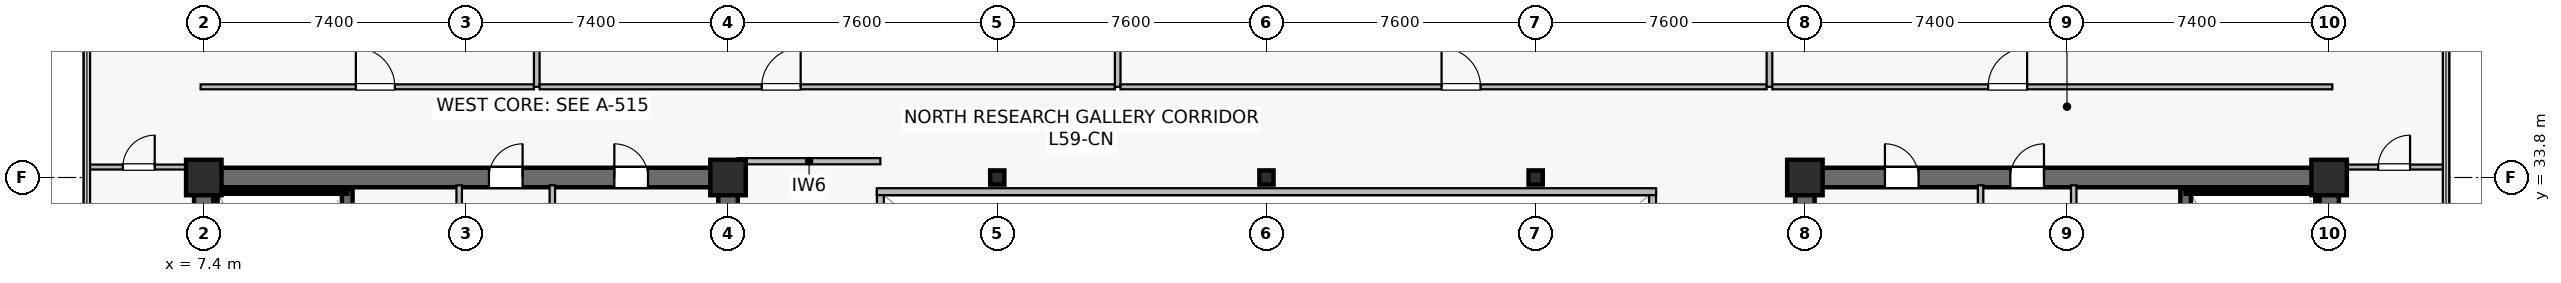
"""IFC4 building model, lengths in metres.
Left out: names, types, materials, properties, quantities, classifications, styles, units other than length and angle.
Written with IfcOpenShell. Run it as: python <this file> out.ifc"""

import sys

from ifc_helpers import new_model, si_unit, direction, frame, frame_2d, origin, origin_2d, place, context, subcontext, project, spatial, rectangle, hollow_rectangle, extrude, source, transform, mapped, element, fill, save


model = new_model("IFC4")
c1 = context("Model", 3, precision=1e-05, world=origin(), true_north=direction((0.0, 1.0)))
c2 = subcontext(c1, "Body", "Model", "MODEL_VIEW")
j1 = project(units=[si_unit("LENGTHUNIT", "METRE"), si_unit("PLANEANGLEUNIT", "RADIAN")], contexts=[c1])
p1 = place(None, origin())
s1 = spatial("IfcSite", under=j1, at=p1, CompositionType="ELEMENT")
p2 = place(p1, origin())
s2 = spatial("IfcBuilding", under=s1, at=p2, CompositionType="ELEMENT")
p3 = place(p2, frame((0.0, 0.0, 246.5)))
s3 = spatial("IfcBuildingStorey", under=s2, at=p3, CompositionType="ELEMENT", Elevation=246.5)
p4 = place(p3, frame((7.125, 33.8, 0.0), z_axis=(0.0, 0.0, 1.0), x_axis=(1.0, 0.0, 0.0)))
e1 = element("IfcWall", 1, at=p4, inside=s3, PredefinedType="SHEAR", context=c2, shape_type="SweptSolid", body=[
    extrude(rectangle(XDim=15.35, YDim=0.55, at=frame_2d((7.675, 0.0))), origin(), (0.0, 0.0, 1.0), 3.8),
])
p5 = place(p4, frame((8.325, 0.0, 0.0)))
e2 = element("IfcOpeningElement", 2, at=p5, cuts=e1, PredefinedType="OPENING", context=c2, shape_type="SweptSolid", body=[
    extrude(rectangle(XDim=0.95, YDim=2.15, at=frame_2d((0.475, 1.075))), frame((0.0, 0.285, 0.0), z_axis=(0.0, -1.0, 0.0), x_axis=(1.0, 0.0, 0.0)), (0.0, 0.0, 1.0), 0.57),
])
p6 = place(p4, frame((11.865, 0.0, 0.0)))
e3 = element("IfcOpeningElement", 3, at=p6, cuts=e1, PredefinedType="OPENING", context=c2, shape_type="SweptSolid", body=[
    extrude(rectangle(XDim=0.95, YDim=2.15, at=frame_2d((0.475, 1.075))), frame((0.0, 0.285, 0.0), z_axis=(0.0, -1.0, 0.0), x_axis=(1.0, 0.0, 0.0)), (0.0, 0.0, 1.0), 0.57),
])
p7 = place(p3, frame((7.4, 15.075, 0.0), z_axis=(0.0, 0.0, 1.0), x_axis=(0.0, 1.0, 0.0)))
e4 = element("IfcWall", 4, at=p7, inside=s3, PredefinedType="SHEAR", context=c2, shape_type="SweptSolid", body=[
    extrude(rectangle(XDim=18.45, YDim=0.55, at=frame_2d((9.225, 0.0))), origin(), (0.0, 0.0, 1.0), 3.8),
])
p8 = place(p3, frame((22.2, 15.075, 0.0), z_axis=(0.0, 0.0, 1.0), x_axis=(0.0, 1.0, 0.0)))
e5 = element("IfcWall", 5, at=p8, inside=s3, PredefinedType="SHEAR", context=c2, shape_type="SweptSolid", body=[
    extrude(rectangle(XDim=18.45, YDim=0.55, at=frame_2d((9.225, 0.0))), origin(), (0.0, 0.0, 1.0), 3.8),
])
p9 = place(p8, frame((3.475, 0.0, 0.0)))
e6 = element("IfcOpeningElement", 6, at=p9, cuts=e5, PredefinedType="OPENING", context=c2, shape_type="SweptSolid", body=[
    extrude(rectangle(XDim=1.42, YDim=2.2, at=frame_2d((0.71, 1.1))), frame((0.0, 0.285, 0.0), z_axis=(0.0, -1.0, 0.0), x_axis=(1.0, 0.0, 0.0)), (0.0, 0.0, 1.0), 0.57),
])
p10 = place(p3, frame((11.45, 24.85, 0.0), z_axis=(0.0, 0.0, 1.0), x_axis=(0.0, 1.0, 0.0)))
e7 = element("IfcWall", 7, at=p10, inside=s3, PredefinedType="SHEAR", context=c2, shape_type="SweptSolid", body=[
    extrude(rectangle(XDim=8.63, YDim=0.3, at=frame_2d((4.315, 0.0))), origin(), (0.0, 0.0, 1.0), 3.8),
])
p11 = place(p10, frame((0.42, 0.0, 0.0)))
e8 = element("IfcOpeningElement", 8, at=p11, cuts=e7, PredefinedType="OPENING", context=c2, shape_type="SweptSolid", body=[
    extrude(rectangle(XDim=1.1, YDim=2.15, at=frame_2d((0.55, 1.075))), frame((0.0, 0.16, 0.0), z_axis=(0.0, -1.0, 0.0), x_axis=(1.0, 0.0, 0.0)), (0.0, 0.0, 1.0), 0.32),
])
p12 = place(p3, frame((7.73, 33.4, 0.0), z_axis=(0.0, 0.0, 1.0), x_axis=(1.0, 0.0, 0.0)))
e9 = element("IfcWall", 9, at=p12, inside=s3, PredefinedType="SOLIDWALL", context=c2, shape_type="SweptSolid", body=[
    extrude(rectangle(XDim=3.72, YDim=0.12, at=frame_2d((1.86, 0.0))), origin(), (0.0, 0.0, 1.0), 3.8),
])
p13 = place(p3, frame((7.73, 25.0, 0.0), z_axis=(0.0, 0.0, 1.0), x_axis=(0.0, 1.0, 0.0)))
e10 = element("IfcWall", 10, at=p13, inside=s3, PredefinedType="SOLIDWALL", context=c2, shape_type="SweptSolid", body=[
    extrude(rectangle(XDim=8.32, YDim=0.12, at=frame_2d((4.16, 0.0))), origin(), (0.0, 0.0, 1.0), 3.8),
])
p14 = place(p3, frame((52.325, 33.8, 0.0), z_axis=(0.0, 0.0, 1.0), x_axis=(1.0, 0.0, 0.0)))
e11 = element("IfcWall", 11, at=p14, inside=s3, PredefinedType="SHEAR", context=c2, shape_type="SweptSolid", body=[
    extrude(rectangle(XDim=15.35, YDim=0.55, at=frame_2d((7.675, 0.0))), origin(), (0.0, 0.0, 1.0), 3.8),
])
p15 = place(p14, frame((6.075, 0.0, 0.0)))
e12 = element("IfcOpeningElement", 12, at=p15, cuts=e11, PredefinedType="OPENING", context=c2, shape_type="SweptSolid", body=[
    extrude(rectangle(XDim=0.95, YDim=2.15, at=frame_2d((0.475, 1.075))), frame((0.0, 0.285, 0.0), z_axis=(0.0, -1.0, 0.0), x_axis=(1.0, 0.0, 0.0)), (0.0, 0.0, 1.0), 0.57),
])
p16 = place(p14, frame((2.535, 0.0, 0.0)))
e13 = element("IfcOpeningElement", 13, at=p16, cuts=e11, PredefinedType="OPENING", context=c2, shape_type="SweptSolid", body=[
    extrude(rectangle(XDim=0.95, YDim=2.15, at=frame_2d((0.475, 1.075))), frame((0.0, 0.285, 0.0), z_axis=(0.0, -1.0, 0.0), x_axis=(1.0, 0.0, 0.0)), (0.0, 0.0, 1.0), 0.57),
])
p17 = place(p3, frame((52.6, 15.075, 0.0), z_axis=(0.0, 0.0, 1.0), x_axis=(0.0, 1.0, 0.0)))
e14 = element("IfcWall", 14, at=p17, inside=s3, PredefinedType="SHEAR", context=c2, shape_type="SweptSolid", body=[
    extrude(rectangle(XDim=18.45, YDim=0.55, at=frame_2d((9.225, 0.0))), origin(), (0.0, 0.0, 1.0), 3.8),
])
p18 = place(p17, frame((3.475, 0.0, 0.0)))
e15 = element("IfcOpeningElement", 15, at=p18, cuts=e14, PredefinedType="OPENING", context=c2, shape_type="SweptSolid", body=[
    extrude(rectangle(XDim=1.42, YDim=2.2, at=frame_2d((0.71, 1.1))), frame((0.0, 0.285, 0.0), z_axis=(0.0, -1.0, 0.0), x_axis=(1.0, 0.0, 0.0)), (0.0, 0.0, 1.0), 0.57),
])
p19 = place(p3, frame((67.4, 15.075, 0.0), z_axis=(0.0, 0.0, 1.0), x_axis=(0.0, 1.0, 0.0)))
e16 = element("IfcWall", 16, at=p19, inside=s3, PredefinedType="SHEAR", context=c2, shape_type="SweptSolid", body=[
    extrude(rectangle(XDim=18.45, YDim=0.55, at=frame_2d((9.225, 0.0))), origin(), (0.0, 0.0, 1.0), 3.8),
])
p20 = place(p3, frame((63.35, 24.85, 0.0), z_axis=(0.0, 0.0, 1.0), x_axis=(0.0, 1.0, 0.0)))
e17 = element("IfcWall", 17, at=p20, inside=s3, PredefinedType="SHEAR", context=c2, shape_type="SweptSolid", body=[
    extrude(rectangle(XDim=8.63, YDim=0.3, at=frame_2d((4.315, 0.0))), origin(), (0.0, 0.0, 1.0), 3.8),
])
p21 = place(p20, frame((0.42, 0.0, 0.0)))
e18 = element("IfcOpeningElement", 18, at=p21, cuts=e17, PredefinedType="OPENING", context=c2, shape_type="SweptSolid", body=[
    extrude(rectangle(XDim=1.1, YDim=2.15, at=frame_2d((0.55, 1.075))), frame((0.0, 0.16, 0.0), z_axis=(0.0, -1.0, 0.0), x_axis=(1.0, 0.0, 0.0)), (0.0, 0.0, 1.0), 0.32),
])
p22 = place(p3, frame((63.35, 33.4, 0.0), z_axis=(0.0, 0.0, 1.0), x_axis=(1.0, 0.0, 0.0)))
e19 = element("IfcWall", 19, at=p22, inside=s3, PredefinedType="SOLIDWALL", context=c2, shape_type="SweptSolid", body=[
    extrude(rectangle(XDim=3.72, YDim=0.12, at=frame_2d((1.86, 0.0))), origin(), (0.0, 0.0, 1.0), 3.8),
])
p23 = place(p3, frame((67.07, 25.0, 0.0), z_axis=(0.0, 0.0, 1.0), x_axis=(0.0, 1.0, 0.0)))
e20 = element("IfcWall", 20, at=p23, inside=s3, PredefinedType="SOLIDWALL", context=c2, shape_type="SweptSolid", body=[
    extrude(rectangle(XDim=8.32, YDim=0.12, at=frame_2d((4.16, 0.0))), origin(), (0.0, 0.0, 1.0), 3.8),
])
m1 = source(origin(), c2, "Body", "SweptSolid", [
    extrude(rectangle(XDim=1.0, YDim=1.0, at=origin_2d()), origin(), (0.0, 0.0, 1.0), 4.1),
])
for number, where, z_axis, x_axis in (
    (21, (7.4, 33.8, 0.0), (0.0, 0.0, 1.0), (1.0, 0.0, 0.0)),
    (22, (22.2, 33.8, 0.0), (0.0, 0.0, 1.0), (1.0, 0.0, 0.0)),
    (23, (52.6, 33.8, 0.0), (0.0, 0.0, 1.0), (1.0, 0.0, 0.0)),
    (24, (67.4, 33.8, 0.0), (0.0, 0.0, 1.0), (1.0, 0.0, 0.0)),
):
    element("IfcColumn", number, at=place(p3, frame(where, z_axis=z_axis, x_axis=x_axis)), inside=s3, PredefinedType="COLUMN", context=c2, shape_type="MappedRepresentation", body=[
        mapped(m1, transform((0.0, 0.0, 0.0), scale=1.0)),
    ])
m2 = source(origin(), c2, "Body", "SweptSolid", [
    extrude(hollow_rectangle(XDim=0.4, YDim=0.4, WallThickness=0.019, at=origin_2d()), origin(), (0.0, 0.0, 1.0), 4.1),
])
for number, where, z_axis, x_axis in (
    (25, (29.8, 33.8, 0.0), (0.0, 0.0, 1.0), (1.0, 0.0, 0.0)),
    (26, (37.4, 33.8, 0.0), (0.0, 0.0, 1.0), (1.0, 0.0, 0.0)),
    (27, (45.0, 33.8, 0.0), (0.0, 0.0, 1.0), (1.0, 0.0, 0.0)),
):
    element("IfcColumn", number, at=place(p3, frame(where, z_axis=z_axis, x_axis=x_axis)), inside=s3, PredefinedType="COLUMN", context=c2, shape_type="MappedRepresentation", body=[
        mapped(m2, transform((0.0, 0.0, 0.0), scale=1.0)),
    ])
p24 = place(p3, frame((14.61, 29.65, 0.0), z_axis=(0.0, 0.0, 1.0), x_axis=(0.0, 1.0, 0.0)))
e28 = element("IfcWall", 28, at=p24, inside=s3, PredefinedType="PLUMBINGWALL", context=c2, shape_type="SweptSolid", body=[
    extrude(rectangle(XDim=3.93, YDim=0.155, at=frame_2d((1.965, 0.0))), origin(), (0.0, 0.0, 1.0), 3.197),
])
p25 = place(p3, frame((17.24, 29.65, 0.0), z_axis=(0.0, 0.0, 1.0), x_axis=(0.0, 1.0, 0.0)))
e29 = element("IfcWall", 29, at=p25, inside=s3, PredefinedType="PLUMBINGWALL", context=c2, shape_type="SweptSolid", body=[
    extrude(rectangle(XDim=3.93, YDim=0.155, at=frame_2d((1.965, 0.0))), origin(), (0.0, 0.0, 1.0), 3.8),
])
p26 = place(p3, frame((60.19, 29.65, 0.0), z_axis=(0.0, 0.0, 1.0), x_axis=(0.0, 1.0, 0.0)))
e30 = element("IfcWall", 30, at=p26, inside=s3, PredefinedType="PLUMBINGWALL", context=c2, shape_type="SweptSolid", body=[
    extrude(rectangle(XDim=3.93, YDim=0.155, at=frame_2d((1.965, 0.0))), origin(), (0.0, 0.0, 1.0), 3.197),
])
p27 = place(p3, frame((57.56, 29.65, 0.0), z_axis=(0.0, 0.0, 1.0), x_axis=(0.0, 1.0, 0.0)))
e31 = element("IfcWall", 31, at=p27, inside=s3, PredefinedType="PLUMBINGWALL", context=c2, shape_type="SweptSolid", body=[
    extrude(rectangle(XDim=3.93, YDim=0.155, at=frame_2d((1.965, 0.0))), origin(), (0.0, 0.0, 1.0), 3.8),
])
p28 = place(p3, frame((22.475, 34.26, 0.0), z_axis=(0.0, 0.0, 1.0), x_axis=(1.0, 0.0, 0.0)))
e32 = element("IfcWall", 32, at=p28, inside=s3, PredefinedType="PARTITIONING", context=c2, shape_type="SweptSolid", body=[
    extrude(rectangle(XDim=4.025, YDim=0.175, at=frame_2d((2.012, 0.0))), origin(), (0.0, 0.0, 1.0), 3.535),
])
p29 = place(p3, frame((26.5, 15.2, 0.0), z_axis=(0.0, 0.0, 1.0), x_axis=(0.0, 1.0, 0.0)))
e33 = element("IfcWall", 33, at=p29, inside=s3, PredefinedType="SOLIDWALL", context=c2, shape_type="SweptSolid", body=[
    extrude(rectangle(XDim=18.2, YDim=0.195, at=frame_2d((9.1, 0.0))), origin(), (0.0, 0.0, 1.0), 3.8),
])
p30 = place(p29, frame((1.8, 0.0, 0.9)))
e34 = element("IfcOpeningElement", 34, at=p30, cuts=e33, PredefinedType="OPENING", context=c2, shape_type="SweptSolid", body=[
    extrude(rectangle(XDim=1.2, YDim=1.35, at=frame_2d((0.6, 0.675))), frame((0.0, 0.107, 0.0), z_axis=(0.0, -1.0, 0.0), x_axis=(1.0, 0.0, 0.0)), (0.0, 0.0, 1.0), 0.215),
])
p31 = place(p29, frame((13.2, 0.0, 0.9)))
e35 = element("IfcOpeningElement", 35, at=p31, cuts=e33, PredefinedType="OPENING", context=c2, shape_type="SweptSolid", body=[
    extrude(rectangle(XDim=1.2, YDim=1.35, at=frame_2d((0.6, 0.675))), frame((0.0, 0.107, 0.0), z_axis=(0.0, -1.0, 0.0), x_axis=(1.0, 0.0, 0.0)), (0.0, 0.0, 1.0), 0.215),
])
p32 = place(p3, frame((48.3, 15.2, 0.0), z_axis=(0.0, 0.0, 1.0), x_axis=(0.0, 1.0, 0.0)))
e36 = element("IfcWall", 36, at=p32, inside=s3, PredefinedType="SOLIDWALL", context=c2, shape_type="SweptSolid", body=[
    extrude(rectangle(XDim=18.2, YDim=0.195, at=frame_2d((9.1, 0.0))), origin(), (0.0, 0.0, 1.0), 3.8),
])
p33 = place(p32, frame((1.8, 0.0, 0.9)))
e37 = element("IfcOpeningElement", 37, at=p33, cuts=e36, PredefinedType="OPENING", context=c2, shape_type="SweptSolid", body=[
    extrude(rectangle(XDim=1.2, YDim=1.35, at=frame_2d((0.6, 0.675))), frame((0.0, 0.107, 0.0), z_axis=(0.0, -1.0, 0.0), x_axis=(1.0, 0.0, 0.0)), (0.0, 0.0, 1.0), 0.215),
])
p34 = place(p32, frame((13.2, 0.0, 0.9)))
e38 = element("IfcOpeningElement", 38, at=p34, cuts=e36, PredefinedType="OPENING", context=c2, shape_type="SweptSolid", body=[
    extrude(rectangle(XDim=1.2, YDim=1.35, at=frame_2d((0.6, 0.675))), frame((0.0, 0.107, 0.0), z_axis=(0.0, -1.0, 0.0), x_axis=(1.0, 0.0, 0.0)), (0.0, 0.0, 1.0), 0.215),
])
p35 = place(p3, frame((26.4, 33.4, 0.0), z_axis=(0.0, 0.0, 1.0), x_axis=(1.0, 0.0, 0.0)))
e39 = element("IfcWall", 39, at=p35, inside=s3, PredefinedType="SOLIDWALL", context=c2, shape_type="SweptSolid", body=[
    extrude(rectangle(XDim=22.0, YDim=0.195, at=frame_2d((11.0, 0.0))), origin(), (0.0, 0.0, 1.0), 3.8),
])
p36 = place(p3, frame((7.31, 36.36, 0.0), z_axis=(0.0, 0.0, 1.0), x_axis=(1.0, 0.0, 0.0)))
e40 = element("IfcWall", 40, at=p36, inside=s3, PredefinedType="PARTITIONING", context=c2, shape_type="SweptSolid", body=[
    extrude(rectangle(XDim=9.41, YDim=0.14, at=frame_2d((4.705, 0.0))), origin(), (0.0, 0.0, 1.0), 3.197),
])
p37 = place(p36, frame((4.383, 0.0, 0.0)))
e41 = element("IfcOpeningElement", 41, at=p37, cuts=e40, PredefinedType="OPENING", context=c2, shape_type="SweptSolid", body=[
    extrude(rectangle(XDim=1.1, YDim=2.18, at=frame_2d((0.55, 1.09))), frame((0.0, 0.08, 0.0), z_axis=(0.0, -1.0, 0.0), x_axis=(1.0, 0.0, 0.0)), (0.0, 0.0, 1.0), 0.16),
])
p38 = place(p3, frame((16.8, 36.36, 0.0), z_axis=(0.0, 0.0, 1.0), x_axis=(0.0, 1.0, 0.0)))
e42 = element("IfcWall", 42, at=p38, inside=s3, PredefinedType="PARTITIONING", context=c2, shape_type="SweptSolid", body=[
    extrude(rectangle(XDim=9.53, YDim=0.16, at=frame_2d((4.765, 0.0))), origin(), (0.0, 0.0, 1.0), 3.135),
])
p39 = place(p3, frame((16.88, 36.36, 0.0), z_axis=(0.0, 0.0, 1.0), x_axis=(1.0, 0.0, 0.0)))
e43 = element("IfcWall", 43, at=p39, inside=s3, PredefinedType="PARTITIONING", context=c2, shape_type="SweptSolid", body=[
    extrude(rectangle(XDim=16.24, YDim=0.14, at=frame_2d((8.12, 0.0))), origin(), (0.0, 0.0, 1.0), 3.197),
])
p40 = place(p39, frame((6.271, 0.0, 0.0)))
e44 = element("IfcOpeningElement", 44, at=p40, cuts=e43, PredefinedType="OPENING", context=c2, shape_type="SweptSolid", body=[
    extrude(rectangle(XDim=1.1, YDim=2.18, at=frame_2d((0.55, 1.09))), frame((0.0, 0.08, 0.0), z_axis=(0.0, -1.0, 0.0), x_axis=(1.0, 0.0, 0.0)), (0.0, 0.0, 1.0), 0.16),
])
p41 = place(p3, frame((33.2, 36.36, 0.0), z_axis=(0.0, 0.0, 1.0), x_axis=(0.0, 1.0, 0.0)))
e45 = element("IfcWall", 45, at=p41, inside=s3, PredefinedType="PARTITIONING", context=c2, shape_type="SweptSolid", body=[
    extrude(rectangle(XDim=8.33, YDim=0.16, at=frame_2d((4.165, 0.0))), origin(), (0.0, 0.0, 1.0), 3.135),
])
p42 = place(p3, frame((33.28, 36.36, 0.0), z_axis=(0.0, 0.0, 1.0), x_axis=(1.0, 0.0, 0.0)))
e46 = element("IfcWall", 46, at=p42, inside=s3, PredefinedType="PARTITIONING", context=c2, shape_type="SweptSolid", body=[
    extrude(rectangle(XDim=18.24, YDim=0.14, at=frame_2d((9.12, 0.0))), origin(), (0.0, 0.0, 1.0), 3.197),
])
p43 = place(p42, frame((9.063, 0.0, 0.0)))
e47 = element("IfcOpeningElement", 47, at=p43, cuts=e46, PredefinedType="OPENING", context=c2, shape_type="SweptSolid", body=[
    extrude(rectangle(XDim=1.1, YDim=2.18, at=frame_2d((0.55, 1.09))), frame((0.0, 0.08, 0.0), z_axis=(0.0, -1.0, 0.0), x_axis=(1.0, 0.0, 0.0)), (0.0, 0.0, 1.0), 0.16),
])
p44 = place(p3, frame((51.6, 36.36, 0.0), z_axis=(0.0, 0.0, 1.0), x_axis=(0.0, 1.0, 0.0)))
e48 = element("IfcWall", 48, at=p44, inside=s3, PredefinedType="PARTITIONING", context=c2, shape_type="SweptSolid", body=[
    extrude(rectangle(XDim=9.53, YDim=0.16, at=frame_2d((4.765, 0.0))), origin(), (0.0, 0.0, 1.0), 3.135),
])
p45 = place(p3, frame((51.68, 36.36, 0.0), z_axis=(0.0, 0.0, 1.0), x_axis=(1.0, 0.0, 0.0)))
e49 = element("IfcWall", 49, at=p45, inside=s3, PredefinedType="PARTITIONING", context=c2, shape_type="SweptSolid", body=[
    extrude(rectangle(XDim=15.81, YDim=0.14, at=frame_2d((7.905, 0.0))), origin(), (0.0, 0.0, 1.0), 3.197),
])
p46 = place(p45, frame((6.094, 0.0, 0.0)))
e50 = element("IfcOpeningElement", 50, at=p46, cuts=e49, PredefinedType="OPENING", context=c2, shape_type="SweptSolid", body=[
    extrude(rectangle(XDim=1.1, YDim=2.18, at=frame_2d((0.55, 1.09))), frame((0.0, 0.08, 0.0), z_axis=(0.0, -1.0, 0.0), x_axis=(1.0, 0.0, 0.0)), (0.0, 0.0, 1.0), 0.16),
])
p47 = place(p3, frame((4.11, 34.095, 0.0), z_axis=(0.0, 0.0, 1.0), x_axis=(1.0, 0.0, 0.0)))
e51 = element("IfcWall", 51, at=p47, inside=s3, PredefinedType="PARTITIONING", context=c2, shape_type="SweptSolid", body=[
    extrude(rectangle(XDim=2.91, YDim=0.14, at=frame_2d((1.455, 0.0))), origin(), (0.0, 0.0, 1.0), 3.8),
])
p48 = place(p47, frame((1.005, 0.0, 0.0)))
e52 = element("IfcOpeningElement", 52, at=p48, cuts=e51, PredefinedType="OPENING", context=c2, shape_type="SweptSolid", body=[
    extrude(rectangle(XDim=0.9, YDim=2.1, at=frame_2d((0.45, 1.05))), frame((0.0, 0.08, 0.0), z_axis=(0.0, -1.0, 0.0), x_axis=(1.0, 0.0, 0.0)), (0.0, 0.0, 1.0), 0.16),
])
p49 = place(p3, frame((67.78, 34.095, 0.0), z_axis=(0.0, 0.0, 1.0), x_axis=(1.0, 0.0, 0.0)))
e53 = element("IfcWall", 53, at=p49, inside=s3, PredefinedType="PARTITIONING", context=c2, shape_type="SweptSolid", body=[
    extrude(rectangle(XDim=2.91, YDim=0.14, at=frame_2d((1.455, 0.0))), origin(), (0.0, 0.0, 1.0), 3.8),
])
p50 = place(p49, frame((1.005, 0.0, 0.0)))
e54 = element("IfcOpeningElement", 54, at=p50, cuts=e53, PredefinedType="OPENING", context=c2, shape_type="SweptSolid", body=[
    extrude(rectangle(XDim=0.9, YDim=2.1, at=frame_2d((0.45, 1.05))), frame((0.0, 0.08, 0.0), z_axis=(0.0, -1.0, 0.0), x_axis=(1.0, 0.0, 0.0)), (0.0, 0.0, 1.0), 0.16),
])
m3 = source(origin(), c2, "Body", "SweptSolid", [
    extrude(rectangle(XDim=0.95, YDim=2.15, at=frame_2d((0.475, 1.075))), frame((0.0, 0.025, 0.0), z_axis=(0.0, -1.0, 0.0), x_axis=(1.0, 0.0, 0.0)), (0.0, 0.0, 1.0), 0.05),
])
p51 = place(p5, origin())
e55 = element("IfcDoor", 55, at=p51, inside=s3, OperationType="SINGLE_SWING_RIGHT", PredefinedType="DOOR", context=c2, shape_type="MappedRepresentation", body=[
    mapped(m3, transform((0.0, 0.0, 0.0), scale=1.0)),
])
fill(e2, e55)
p52 = place(p6, origin())
e56 = element("IfcDoor", 56, at=p52, inside=s3, OperationType="SINGLE_SWING_LEFT", PredefinedType="DOOR", context=c2, shape_type="MappedRepresentation", body=[
    mapped(m3, transform((0.0, 0.0, 0.0), scale=1.0)),
])
fill(e3, e56)
p53 = place(p15, origin())
e57 = element("IfcDoor", 57, at=p53, inside=s3, OperationType="SINGLE_SWING_RIGHT", PredefinedType="DOOR", context=c2, shape_type="MappedRepresentation", body=[
    mapped(m3, transform((0.0, 0.0, 0.0), scale=1.0)),
])
fill(e12, e57)
p54 = place(p16, origin())
e58 = element("IfcDoor", 58, at=p54, inside=s3, OperationType="SINGLE_SWING_LEFT", PredefinedType="DOOR", context=c2, shape_type="MappedRepresentation", body=[
    mapped(m3, transform((0.0, 0.0, 0.0), scale=1.0)),
])
fill(e13, e58)
m4 = source(origin(), c2, "Body", "SweptSolid", [
    extrude(rectangle(XDim=1.1, YDim=2.18, at=frame_2d((0.55, 1.09))), frame((0.0, 0.025, 0.0), z_axis=(0.0, -1.0, 0.0), x_axis=(1.0, 0.0, 0.0)), (0.0, 0.0, 1.0), 0.05),
])
p55 = place(p37, origin())
e59 = element("IfcDoor", 59, at=p55, inside=s3, OperationType="SINGLE_SWING_LEFT", PredefinedType="DOOR", context=c2, shape_type="MappedRepresentation", body=[
    mapped(m4, transform((0.0, 0.0, 0.0), scale=1.0)),
])
fill(e41, e59)
p56 = place(p40, origin())
e60 = element("IfcDoor", 60, at=p56, inside=s3, OperationType="SINGLE_SWING_RIGHT", PredefinedType="DOOR", context=c2, shape_type="MappedRepresentation", body=[
    mapped(m4, transform((0.0, 0.0, 0.0), scale=1.0)),
])
fill(e44, e60)
p57 = place(p43, origin())
e61 = element("IfcDoor", 61, at=p57, inside=s3, OperationType="SINGLE_SWING_LEFT", PredefinedType="DOOR", context=c2, shape_type="MappedRepresentation", body=[
    mapped(m4, transform((0.0, 0.0, 0.0), scale=1.0)),
])
fill(e47, e61)
p58 = place(p46, origin())
e62 = element("IfcDoor", 62, at=p58, inside=s3, OperationType="SINGLE_SWING_RIGHT", PredefinedType="DOOR", context=c2, shape_type="MappedRepresentation", body=[
    mapped(m4, transform((0.0, 0.0, 0.0), scale=1.0)),
])
fill(e50, e62)
m5 = source(origin(), c2, "Body", "SweptSolid", [
    extrude(rectangle(XDim=0.9, YDim=2.1, at=frame_2d((0.45, 1.05))), frame((0.0, 0.025, 0.0), z_axis=(0.0, -1.0, 0.0), x_axis=(1.0, 0.0, 0.0)), (0.0, 0.0, 1.0), 0.05),
])
p59 = place(p48, origin())
e63 = element("IfcDoor", 63, at=p59, inside=s3, OperationType="SINGLE_SWING_RIGHT", PredefinedType="DOOR", context=c2, shape_type="MappedRepresentation", body=[
    mapped(m5, transform((0.0, 0.0, 0.0), scale=1.0)),
])
fill(e52, e63)
p60 = place(p50, origin())
e64 = element("IfcDoor", 64, at=p60, inside=s3, OperationType="SINGLE_SWING_RIGHT", PredefinedType="DOOR", context=c2, shape_type="MappedRepresentation", body=[
    mapped(m5, transform((0.0, 0.0, 0.0), scale=1.0)),
])
fill(e54, e64)
save(model, sys.argv[1])
